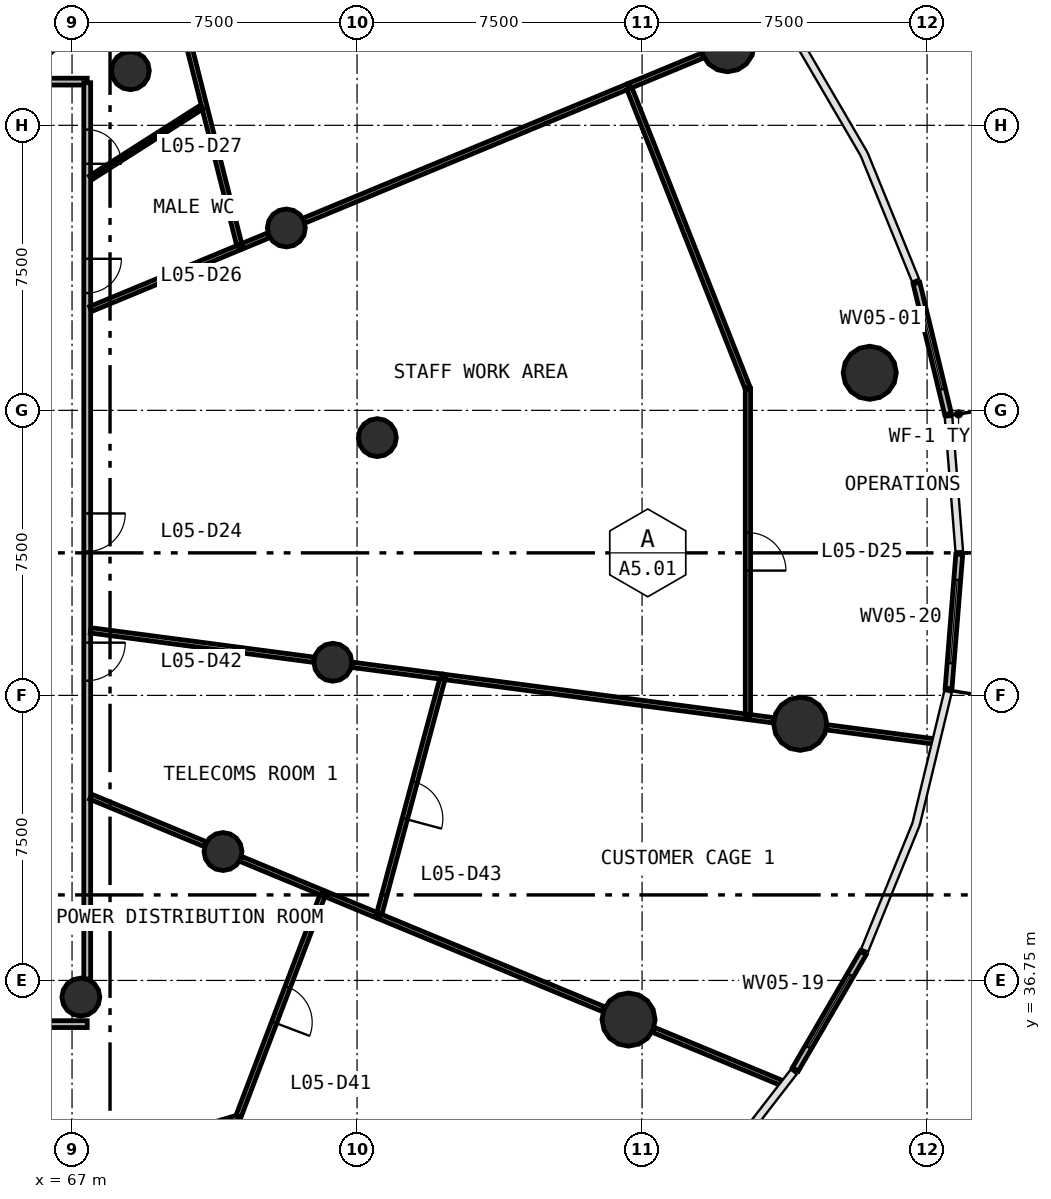
"""IFC4 building model, lengths in metres.
Left out: names, types, materials, properties, quantities, classifications, styles, units other than length and angle.
Written with IfcOpenShell. Run it as: python <this file> out.ifc"""

import sys

from ifc_helpers import new_model, si_unit, direction, frame, frame_2d, origin, origin_2d, place, context, subcontext, project, spatial, rectangle, circle, extrude, source, transform, mapped, element, fill, save


model = new_model("IFC4")
c1 = context("Model", 3, precision=1e-05, world=origin(), true_north=direction((0.0, 1.0)))
c2 = subcontext(c1, "Body", "Model", "MODEL_VIEW")
j1 = project(units=[si_unit("LENGTHUNIT", "METRE"), si_unit("PLANEANGLEUNIT", "RADIAN")], contexts=[c1])
p1 = place(None, origin())
s1 = spatial("IfcSite", under=j1, at=p1, CompositionType="ELEMENT")
p2 = place(p1, origin())
s2 = spatial("IfcBuilding", under=s1, at=p2, CompositionType="ELEMENT")
p3 = place(p2, frame((0.0, 0.0, 22.6)))
s3 = spatial("IfcBuildingStorey", under=s2, at=p3, CompositionType="ELEMENT", Elevation=22.6)
m1 = source(origin(), c2, "Body", "SweptSolid", [
    extrude(circle(Radius=0.7, at=origin_2d()), origin(), (0.0, 0.0, 1.0), 4.4),
])
for number, where, z_axis, x_axis in (
    (1, (87.99, 52.738, 0.0), (0.0, 0.0, 1.0), (1.0, 0.0, 0.0)),
    (2, (84.249, 61.358, 0.0), (0.0, 0.0, 1.0), (1.0, 0.0, 0.0)),
    (3, (81.645, 35.721, 0.0), (0.0, 0.0, 1.0), (1.0, 0.0, 0.0)),
    (4, (86.161, 43.503, 0.0), (0.0, 0.0, 1.0), (1.0, 0.0, 0.0)),
):
    element("IfcColumn", number, at=place(p3, frame(where, z_axis=z_axis, x_axis=x_axis)), inside=s3, PredefinedType="COLUMN", context=c2, shape_type="MappedRepresentation", body=[
        mapped(m1, transform((0.0, 0.0, 0.0), scale=1.0)),
    ])
m2 = source(origin(), c2, "Body", "SweptSolid", [
    extrude(circle(Radius=0.5, at=origin_2d()), origin(), (0.0, 0.0, 1.0), 4.4),
])
for number, where, z_axis, x_axis in (
    (5, (75.034, 51.032, 0.0), (0.0, 0.0, 1.0), (1.0, 0.0, 0.0)),
    (6, (72.639, 56.549, 0.0), (0.0, 0.0, 1.0), (1.0, 0.0, 0.0)),
    (7, (68.535, 60.688, 0.0), (0.0, 0.0, 1.0), (1.0, 0.0, 0.0)),
    (8, (67.232, 36.312, 0.0), (0.0, 0.0, 1.0), (1.0, 0.0, 0.0)),
    (9, (70.972, 40.141, 0.0), (0.0, 0.0, 1.0), (1.0, 0.0, 0.0)),
    (10, (73.863, 45.122, 0.0), (0.0, 0.0, 1.0), (1.0, 0.0, 0.0)),
):
    element("IfcColumn", number, at=place(p3, frame(where, z_axis=z_axis, x_axis=x_axis)), inside=s3, PredefinedType="COLUMN", context=c2, shape_type="MappedRepresentation", body=[
        mapped(m2, transform((0.0, 0.0, 0.0), scale=1.0)),
    ])
p4 = place(p3, frame((90.052, 51.652, 0.0), z_axis=(0.0, 0.0, 1.0), x_axis=(-0.234602378519, 0.972091417508, 0.0)))
e11 = element("IfcWall", 11, at=p4, inside=s3, PredefinedType="STANDARD", context=c2, shape_type="SweptSolid", body=[
    extrude(rectangle(XDim=3.544, YDim=0.18, at=frame_2d((1.772, 0.0))), origin(), (0.0, 0.0, 1.0), 3.698),
])
p5 = place(p4, frame((0.672, 0.0, 0.9)))
e12 = element("IfcOpeningElement", 12, at=p5, cuts=e11, PredefinedType="OPENING", context=c2, shape_type="SweptSolid", body=[
    extrude(rectangle(XDim=2.2, YDim=2.2, at=frame_2d((1.1, 1.1))), frame((0.0, 0.1, 0.0), z_axis=(0.0, -1.0, 0.0), x_axis=(1.0, 0.0, 0.0)), (0.0, 0.0, 1.0), 0.2),
])
p6 = place(p3, frame((86.035, 34.41, 0.0), z_axis=(0.0, 0.0, 1.0), x_axis=(0.503905275905, 0.8637589206, 0.0)))
e13 = element("IfcWall", 13, at=p6, inside=s3, PredefinedType="STANDARD", context=c2, shape_type="SweptSolid", body=[
    extrude(rectangle(XDim=3.546, YDim=0.18, at=frame_2d((1.773, 0.0))), origin(), (0.0, 0.0, 1.0), 3.95),
])
p7 = place(p6, frame((0.673, 0.0, 0.9)))
e14 = element("IfcOpeningElement", 14, at=p7, cuts=e13, PredefinedType="OPENING", context=c2, shape_type="SweptSolid", body=[
    extrude(rectangle(XDim=2.2, YDim=2.2, at=frame_2d((1.1, 1.1))), frame((0.0, 0.1, 0.0), z_axis=(0.0, -1.0, 0.0), x_axis=(1.0, 0.0, 0.0)), (0.0, 0.0, 1.0), 0.2),
])
p8 = place(p3, frame((90.064, 44.427, 0.0), z_axis=(0.0, 0.0, 1.0), x_axis=(0.079624764611, 0.996824907825, 0.0)))
e15 = element("IfcWall", 15, at=p8, inside=s3, PredefinedType="STANDARD", context=c2, shape_type="SweptSolid", body=[
    extrude(rectangle(XDim=3.544, YDim=0.18, at=frame_2d((1.772, 0.0))), origin(), (0.0, 0.0, 1.0), 3.95),
])
p9 = place(p8, frame((0.672, 0.0, 0.9)))
e16 = element("IfcOpeningElement", 16, at=p9, cuts=e15, PredefinedType="OPENING", context=c2, shape_type="SweptSolid", body=[
    extrude(rectangle(XDim=2.2, YDim=2.2, at=frame_2d((1.1, 1.1))), frame((0.0, 0.1, 0.0), z_axis=(0.0, -1.0, 0.0), x_axis=(1.0, 0.0, 0.0)), (0.0, 0.0, 1.0), 0.2),
])
p10 = place(p3, frame((67.4, 35.6, 0.0), z_axis=(0.0, 0.0, 1.0), x_axis=(-1.0, 0.0, 0.0)))
e17 = element("IfcWall", 17, at=p10, inside=s3, PredefinedType="PARTITIONING", context=c2, shape_type="SweptSolid", body=[
    extrude(rectangle(XDim=30.8, YDim=0.18, at=frame_2d((15.4, 0.0))), origin(), (0.0, 0.0, 1.0), 3.05),
])
p11 = place(p10, frame((14.95, 0.0, 0.0)))
e18 = element("IfcOpeningElement", 18, at=p11, cuts=e17, PredefinedType="OPENING", context=c2, shape_type="SweptSolid", body=[
    extrude(rectangle(XDim=1.0, YDim=2.1, at=frame_2d((0.5, 1.05))), frame((0.0, 0.1, 0.0), z_axis=(0.0, -1.0, 0.0), x_axis=(1.0, 0.0, 0.0)), (0.0, 0.0, 1.0), 0.2),
])
p12 = place(p10, frame((12.55, 0.0, 0.0)))
e19 = element("IfcOpeningElement", 19, at=p12, cuts=e17, PredefinedType="OPENING", context=c2, shape_type="SweptSolid", body=[
    extrude(rectangle(XDim=1.0, YDim=2.1, at=frame_2d((0.5, 1.05))), frame((0.0, 0.1, 0.0), z_axis=(0.0, -1.0, 0.0), x_axis=(1.0, 0.0, 0.0)), (0.0, 0.0, 1.0), 0.2),
])
p13 = place(p10, frame((8.95, 0.0, 0.0)))
e20 = element("IfcOpeningElement", 20, at=p13, cuts=e17, PredefinedType="OPENING", context=c2, shape_type="SweptSolid", body=[
    extrude(rectangle(XDim=1.0, YDim=2.1, at=frame_2d((0.5, 1.05))), frame((0.0, 0.1, 0.0), z_axis=(0.0, -1.0, 0.0), x_axis=(1.0, 0.0, 0.0)), (0.0, 0.0, 1.0), 0.2),
])
p14 = place(p3, frame((36.6, 60.4, 0.0), z_axis=(0.0, 0.0, 1.0), x_axis=(1.0, 0.0, 0.0)))
e21 = element("IfcWall", 21, at=p14, inside=s3, PredefinedType="PARTITIONING", context=c2, shape_type="SweptSolid", body=[
    extrude(rectangle(XDim=30.8, YDim=0.18, at=frame_2d((15.4, 0.0))), origin(), (0.0, 0.0, 1.0), 3.05),
])
p15 = place(p14, frame((25.45, 0.0, 0.0)))
e22 = element("IfcOpeningElement", 22, at=p15, cuts=e21, PredefinedType="OPENING", context=c2, shape_type="SweptSolid", body=[
    extrude(rectangle(XDim=0.9, YDim=2.1, at=frame_2d((0.45, 1.05))), frame((0.0, 0.1, 0.0), z_axis=(0.0, -1.0, 0.0), x_axis=(1.0, 0.0, 0.0)), (0.0, 0.0, 1.0), 0.2),
])
p16 = place(p14, frame((14.95, 0.0, 0.0)))
e23 = element("IfcOpeningElement", 23, at=p16, cuts=e21, PredefinedType="OPENING", context=c2, shape_type="SweptSolid", body=[
    extrude(rectangle(XDim=1.0, YDim=2.1, at=frame_2d((0.5, 1.05))), frame((0.0, 0.1, 0.0), z_axis=(0.0, -1.0, 0.0), x_axis=(1.0, 0.0, 0.0)), (0.0, 0.0, 1.0), 0.2),
])
p17 = place(p14, frame((8.95, 0.0, 0.0)))
e24 = element("IfcOpeningElement", 24, at=p17, cuts=e21, PredefinedType="OPENING", context=c2, shape_type="SweptSolid", body=[
    extrude(rectangle(XDim=1.0, YDim=2.1, at=frame_2d((0.5, 1.05))), frame((0.0, 0.1, 0.0), z_axis=(0.0, -1.0, 0.0), x_axis=(1.0, 0.0, 0.0)), (0.0, 0.0, 1.0), 0.2),
])
p18 = place(p3, frame((67.4, 60.37, 0.0), z_axis=(0.0, 0.0, 1.0), x_axis=(0.0, -1.0, 0.0)))
e25 = element("IfcWall", 25, at=p18, inside=s3, PredefinedType="PARTITIONING", context=c2, shape_type="SweptSolid", body=[
    extrude(rectangle(XDim=23.583, YDim=0.18, at=frame_2d((11.791, 0.0))), origin(), (0.0, 0.0, 1.0), 3.05),
])
p19 = place(p18, frame((11.333, 0.0, 0.0)))
e26 = element("IfcOpeningElement", 26, at=p19, cuts=e25, PredefinedType="OPENING", context=c2, shape_type="SweptSolid", body=[
    extrude(rectangle(XDim=1.0, YDim=2.1, at=frame_2d((0.5, 1.05))), frame((0.0, 0.1, 0.0), z_axis=(0.0, -1.0, 0.0), x_axis=(1.0, 0.0, 0.0)), (0.0, 0.0, 1.0), 0.2),
])
p20 = place(p18, frame((4.633, 0.0, 0.0)))
e27 = element("IfcOpeningElement", 27, at=p20, cuts=e25, PredefinedType="OPENING", context=c2, shape_type="SweptSolid", body=[
    extrude(rectangle(XDim=0.9, YDim=2.1, at=frame_2d((0.45, 1.05))), frame((0.0, 0.1, 0.0), z_axis=(0.0, -1.0, 0.0), x_axis=(1.0, 0.0, 0.0)), (0.0, 0.0, 1.0), 0.2),
])
p21 = place(p18, frame((1.232, 0.0, 0.0)))
e28 = element("IfcOpeningElement", 28, at=p21, cuts=e25, PredefinedType="OPENING", context=c2, shape_type="SweptSolid", body=[
    extrude(rectangle(XDim=0.9, YDim=2.1, at=frame_2d((0.45, 1.05))), frame((0.0, 0.1, 0.0), z_axis=(0.0, -1.0, 0.0), x_axis=(1.0, 0.0, 0.0)), (0.0, 0.0, 1.0), 0.2),
])
p22 = place(p18, frame((14.732, 0.0, 0.0)))
e29 = element("IfcOpeningElement", 29, at=p22, cuts=e25, PredefinedType="OPENING", context=c2, shape_type="SweptSolid", body=[
    extrude(rectangle(XDim=1.0, YDim=2.1, at=frame_2d((0.5, 1.05))), frame((0.0, 0.1, 0.0), z_axis=(0.0, -1.0, 0.0), x_axis=(1.0, 0.0, 0.0)), (0.0, 0.0, 1.0), 0.2),
])
p23 = place(p3, frame((73.106, 56.742, 0.0), z_axis=(0.0, 0.0, 1.0), x_axis=(0.923866773136, 0.382714234769, 0.0)))
e30 = element("IfcWall", 30, at=p23, inside=s3, PredefinedType="PARTITIONING", context=c2, shape_type="SweptSolid", body=[
    extrude(rectangle(XDim=9.241, YDim=0.14, at=frame_2d((4.621, 0.0))), origin(), (0.0, 0.0, 1.0), 3.05),
])
p24 = place(p3, frame((84.785, 52.316, 0.0), z_axis=(0.0, 0.0, 1.0), x_axis=(0.0, -1.0, 0.0)))
e31 = element("IfcWall", 31, at=p24, inside=s3, PredefinedType="PARTITIONING", context=c2, shape_type="SweptSolid", body=[
    extrude(rectangle(XDim=8.633, YDim=0.14, at=frame_2d((4.316, 0.0))), origin(), (0.0, 0.0, 1.0), 3.05),
])
p25 = place(p24, frame((3.783, 0.0, 0.0)))
e32 = element("IfcOpeningElement", 32, at=p25, cuts=e31, PredefinedType="OPENING", context=c2, shape_type="SweptSolid", body=[
    extrude(rectangle(XDim=1.0, YDim=2.1, at=frame_2d((0.5, 1.05))), frame((0.0, 0.08, 0.0), z_axis=(0.0, -1.0, 0.0), x_axis=(1.0, 0.0, 0.0)), (0.0, 0.0, 1.0), 0.16),
])
p26 = place(p3, frame((84.774, 52.344, 0.0), z_axis=(0.0, 0.0, 1.0), x_axis=(-0.36705286117, 0.930200084448, 0.0)))
e33 = element("IfcWall", 33, at=p26, inside=s3, PredefinedType="PARTITIONING", context=c2, shape_type="SweptSolid", body=[
    extrude(rectangle(XDim=8.46, YDim=0.14, at=frame_2d((4.23, 0.0))), origin(), (0.0, 0.0, 1.0), 3.05),
])
p27 = place(p3, frame((76.761, 44.74, 0.0), z_axis=(0.0, 0.0, 1.0), x_axis=(0.991445281649, -0.130522999877, 0.0)))
e34 = element("IfcWall", 34, at=p27, inside=s3, PredefinedType="PARTITIONING", context=c2, shape_type="SweptSolid", body=[
    extrude(rectangle(XDim=8.022, YDim=0.14, at=frame_2d((4.011, 0.0))), origin(), (0.0, 0.0, 1.0), 3.05),
])
p28 = place(p3, frame((64.886, 31.206, 0.0), z_axis=(0.0, 0.0, 1.0), x_axis=(0.958287066923, 0.285807448063, 0.0)))
e35 = element("IfcWall", 35, at=p28, inside=s3, PredefinedType="PARTITIONING", context=c2, shape_type="SweptSolid", body=[
    extrude(rectangle(XDim=6.763, YDim=0.14, at=frame_2d((3.381, 0.0))), origin(), (0.0, 0.0, 1.0), 3.05),
])
p29 = place(p3, frame((76.754, 44.711, 0.0), z_axis=(0.0, 0.0, 1.0), x_axis=(-0.259521453513, -0.965737342742, 0.0)))
e36 = element("IfcWall", 36, at=p29, inside=s3, PredefinedType="PARTITIONING", context=c2, shape_type="SweptSolid", body=[
    extrude(rectangle(XDim=6.489, YDim=0.14, at=frame_2d((3.245, 0.0))), origin(), (0.0, 0.0, 1.0), 3.05),
])
p30 = place(p29, frame((2.839, 0.0, 0.0)))
e37 = element("IfcOpeningElement", 37, at=p30, cuts=e36, PredefinedType="OPENING", context=c2, shape_type="SweptSolid", body=[
    extrude(rectangle(XDim=1.0, YDim=2.1, at=frame_2d((0.5, 1.05))), frame((0.0, 0.08, 0.0), z_axis=(0.0, -1.0, 0.0), x_axis=(1.0, 0.0, 0.0)), (0.0, 0.0, 1.0), 0.16),
])
p31 = place(p3, frame((75.097, 38.433, 0.0), z_axis=(0.0, 0.0, 1.0), x_axis=(0.923869490045, -0.382707676125, 0.0)))
e38 = element("IfcWall", 38, at=p31, inside=s3, PredefinedType="PARTITIONING", context=c2, shape_type="SweptSolid", body=[
    extrude(rectangle(XDim=6.382, YDim=0.14, at=frame_2d((3.191, 0.0))), origin(), (0.0, 0.0, 1.0), 3.05),
])
p32 = place(p3, frame((73.613, 39.048, 0.0), z_axis=(0.0, 0.0, 1.0), x_axis=(-0.355249637072, -0.934771466916, 0.0)))
e39 = element("IfcWall", 39, at=p32, inside=s3, PredefinedType="PARTITIONING", context=c2, shape_type="SweptSolid", body=[
    extrude(rectangle(XDim=6.291, YDim=0.14, at=frame_2d((3.146, 0.0))), origin(), (0.0, 0.0, 1.0), 3.05),
])
p33 = place(p32, frame((2.641, 0.0, 0.0)))
e40 = element("IfcOpeningElement", 40, at=p33, cuts=e39, PredefinedType="OPENING", context=c2, shape_type="SweptSolid", body=[
    extrude(rectangle(XDim=1.0, YDim=2.1, at=frame_2d((0.5, 1.05))), frame((0.0, 0.08, 0.0), z_axis=(0.0, -1.0, 0.0), x_axis=(1.0, 0.0, 0.0)), (0.0, 0.0, 1.0), 0.16),
])
p34 = place(p3, frame((67.49, 45.961, 0.0), z_axis=(0.0, 0.0, 1.0), x_axis=(0.991445034615, -0.130524876315, 0.0)))
e41 = element("IfcWall", 41, at=p34, inside=s3, PredefinedType="PARTITIONING", context=c2, shape_type="SweptSolid", body=[
    extrude(rectangle(XDim=5.924, YDim=0.14, at=frame_2d((2.962, 0.0))), origin(), (0.0, 0.0, 1.0), 3.05),
])
p35 = place(p3, frame((71.417, 56.043, 0.0), z_axis=(0.0, 0.0, 1.0), x_axis=(-0.245211508641, 0.969469605521, 0.0)))
e42 = element("IfcWall", 42, at=p35, inside=s3, PredefinedType="PARTITIONING", context=c2, shape_type="SweptSolid", body=[
    extrude(rectangle(XDim=5.923, YDim=0.14, at=frame_2d((2.961, 0.0))), origin(), (0.0, 0.0, 1.0), 3.05),
])
p36 = place(p3, frame((67.49, 54.416, 0.0), z_axis=(0.0, 0.0, 1.0), x_axis=(0.92388430195, 0.382671917718, 0.0)))
e43 = element("IfcWall", 43, at=p36, inside=s3, PredefinedType="PARTITIONING", context=c2, shape_type="SweptSolid", body=[
    extrude(rectangle(XDim=4.221, YDim=0.14, at=frame_2d((2.11, 0.0))), origin(), (0.0, 0.0, 1.0), 3.05),
])
p37 = place(p3, frame((82.296, 35.451, 0.0), z_axis=(0.0, 0.0, 1.0), x_axis=(0.923882033439, -0.382677394537, 0.0)))
e44 = element("IfcWall", 44, at=p37, inside=s3, PredefinedType="PARTITIONING", context=c2, shape_type="SweptSolid", body=[
    extrude(rectangle(XDim=3.642, YDim=0.14, at=frame_2d((1.821, 0.0))), origin(), (0.0, 0.0, 1.0), 3.05),
])
p38 = place(p3, frame((67.49, 41.584, 0.0), z_axis=(0.0, 0.0, 1.0), x_axis=(0.923911109142, -0.382607190737, 0.0)))
e45 = element("IfcWall", 45, at=p38, inside=s3, PredefinedType="PARTITIONING", context=c2, shape_type="SweptSolid", body=[
    extrude(rectangle(XDim=3.264, YDim=0.14, at=frame_2d((1.632, 0.0))), origin(), (0.0, 0.0, 1.0), 3.05),
])
p39 = place(p3, frame((86.859, 43.411, 0.0), z_axis=(0.0, 0.0, 1.0), x_axis=(0.991443227873, -0.130538599287, 0.0)))
e46 = element("IfcWall", 46, at=p39, inside=s3, PredefinedType="PARTITIONING", context=c2, shape_type="SweptSolid", body=[
    extrude(rectangle(XDim=2.854, YDim=0.14, at=frame_2d((1.427, 0.0))), origin(), (0.0, 0.0, 1.0), 3.05),
])
p40 = place(p3, frame((74.363, 45.056, 0.0), z_axis=(0.0, 0.0, 1.0), x_axis=(0.991433759963, -0.130610488118, 0.0)))
e47 = element("IfcWall", 47, at=p40, inside=s3, PredefinedType="PARTITIONING", context=c2, shape_type="SweptSolid", body=[
    extrude(rectangle(XDim=2.389, YDim=0.14, at=frame_2d((1.194, 0.0))), origin(), (0.0, 0.0, 1.0), 3.05),
])
p41 = place(p3, frame((71.439, 39.948, 0.0), z_axis=(0.0, 0.0, 1.0), x_axis=(0.923861804277, -0.382726229306, 0.0)))
e48 = element("IfcWall", 48, at=p41, inside=s3, PredefinedType="PARTITIONING", context=c2, shape_type="SweptSolid", body=[
    extrude(rectangle(XDim=2.323, YDim=0.14, at=frame_2d((1.161, 0.0))), origin(), (0.0, 0.0, 1.0), 3.05),
])
p42 = place(p3, frame((81.671, 60.29, 0.0), z_axis=(0.0, 0.0, 1.0), x_axis=(0.923902679831, 0.382627545012, 0.0)))
e49 = element("IfcWall", 49, at=p42, inside=s3, PredefinedType="PARTITIONING", context=c2, shape_type="SweptSolid", body=[
    extrude(rectangle(XDim=2.085, YDim=0.14, at=frame_2d((1.042, 0.0))), origin(), (0.0, 0.0, 1.0), 3.05),
])
p43 = place(p3, frame((73.677, 39.021, 0.0), z_axis=(0.0, 0.0, 1.0), x_axis=(0.923859397542, -0.382732038864, 0.0)))
e50 = element("IfcWall", 50, at=p43, inside=s3, PredefinedType="PARTITIONING", context=c2, shape_type="SweptSolid", body=[
    extrude(rectangle(XDim=1.437, YDim=0.14, at=frame_2d((0.718, 0.0))), origin(), (0.0, 0.0, 1.0), 3.05),
])
p44 = place(p3, frame((71.483, 56.07, 0.0), z_axis=(0.0, 0.0, 1.0), x_axis=(0.923945120737, 0.382525049986, 0.0)))
e51 = element("IfcWall", 51, at=p44, inside=s3, PredefinedType="PARTITIONING", context=c2, shape_type="SweptSolid", body=[
    extrude(rectangle(XDim=0.747, YDim=0.14, at=frame_2d((0.374, 0.0))), origin(), (0.0, 0.0, 1.0), 3.05),
])
p45 = place(p3, frame((84.815, 43.68, 0.0), z_axis=(0.0, 0.0, 1.0), x_axis=(0.991458111103, -0.130425511035, 0.0)))
e52 = element("IfcWall", 52, at=p45, inside=s3, PredefinedType="PARTITIONING", context=c2, shape_type="SweptSolid", body=[
    extrude(rectangle(XDim=0.653, YDim=0.14, at=frame_2d((0.327, 0.0))), origin(), (0.0, 0.0, 1.0), 3.05),
])
p46 = place(p3, frame((67.49, 57.868, 0.0), z_axis=(0.0, 0.0, 1.0), x_axis=(0.843371271412, 0.537331274501, 0.0)))
e53 = element("IfcWall", 53, at=p46, inside=s3, PredefinedType="PARTITIONING", context=c2, shape_type="SweptSolid", body=[
    extrude(rectangle(XDim=3.465, YDim=0.12, at=frame_2d((1.733, 0.0))), origin(), (0.0, 0.0, 1.0), 3.05),
])
p47 = place(p3, frame((65.63, 60.49, 0.0), z_axis=(0.0, 0.0, 1.0), x_axis=(0.737304203513, 0.675560886584, 0.0)))
e54 = element("IfcWall", 54, at=p47, inside=s3, PredefinedType="PARTITIONING", context=c2, shape_type="SweptSolid", body=[
    extrude(rectangle(XDim=2.634, YDim=0.12, at=frame_2d((1.317, 0.0))), origin(), (0.0, 0.0, 1.0), 3.05),
])
m3 = source(origin(), c2, "Body", "SweptSolid", [
    extrude(rectangle(XDim=2.2, YDim=2.2, at=frame_2d((1.1, 1.1))), frame((0.0, 0.03, 0.0), z_axis=(0.0, -1.0, 0.0), x_axis=(1.0, 0.0, 0.0)), (0.0, 0.0, 1.0), 0.06),
])
p48 = place(p5, origin())
e55 = element("IfcWindow", 55, at=p48, inside=s3, PartitioningType="SINGLE_PANEL", PredefinedType="WINDOW", context=c2, shape_type="MappedRepresentation", body=[
    mapped(m3, transform((0.0, 0.0, 0.0), scale=1.0)),
])
fill(e12, e55)
p49 = place(p7, origin())
e56 = element("IfcWindow", 56, at=p49, inside=s3, PartitioningType="SINGLE_PANEL", PredefinedType="WINDOW", context=c2, shape_type="MappedRepresentation", body=[
    mapped(m3, transform((0.0, 0.0, 0.0), scale=1.0)),
])
fill(e14, e56)
p50 = place(p9, origin())
e57 = element("IfcWindow", 57, at=p50, inside=s3, PartitioningType="SINGLE_PANEL", PredefinedType="WINDOW", context=c2, shape_type="MappedRepresentation", body=[
    mapped(m3, transform((0.0, 0.0, 0.0), scale=1.0)),
])
fill(e16, e57)
m4 = source(origin(), c2, "Body", "SweptSolid", [
    extrude(rectangle(XDim=1.0, YDim=2.1, at=frame_2d((0.5, 1.05))), frame((0.0, 0.025, 0.0), z_axis=(0.0, -1.0, 0.0), x_axis=(1.0, 0.0, 0.0)), (0.0, 0.0, 1.0), 0.05),
])
p51 = place(p19, origin())
e58 = element("IfcDoor", 58, at=p51, inside=s3, OperationType="SINGLE_SWING_LEFT", PredefinedType="DOOR", context=c2, shape_type="MappedRepresentation", body=[
    mapped(m4, transform((0.0, 0.0, 0.0), scale=1.0)),
])
fill(e26, e58)
p52 = place(p25, origin())
e59 = element("IfcDoor", 59, at=p52, inside=s3, OperationType="SINGLE_SWING_RIGHT", PredefinedType="DOOR", context=c2, shape_type="MappedRepresentation", body=[
    mapped(m4, transform((0.0, 0.0, 0.0), scale=1.0)),
])
fill(e32, e59)
m5 = source(origin(), c2, "Body", "SweptSolid", [
    extrude(rectangle(XDim=0.9, YDim=2.1, at=frame_2d((0.45, 1.05))), frame((0.0, 0.025, 0.0), z_axis=(0.0, -1.0, 0.0), x_axis=(1.0, 0.0, 0.0)), (0.0, 0.0, 1.0), 0.05),
])
p53 = place(p20, origin())
e60 = element("IfcDoor", 60, at=p53, inside=s3, OperationType="SINGLE_SWING_LEFT", PredefinedType="DOOR", context=c2, shape_type="MappedRepresentation", body=[
    mapped(m5, transform((0.0, 0.0, 0.0), scale=1.0)),
])
fill(e27, e60)
p54 = place(p21, origin())
e61 = element("IfcDoor", 61, at=p54, inside=s3, OperationType="SINGLE_SWING_RIGHT", PredefinedType="DOOR", context=c2, shape_type="MappedRepresentation", body=[
    mapped(m5, transform((0.0, 0.0, 0.0), scale=1.0)),
])
fill(e28, e61)
p55 = place(p33, origin())
e62 = element("IfcDoor", 62, at=p55, inside=s3, OperationType="SINGLE_SWING_RIGHT", PredefinedType="DOOR", context=c2, shape_type="MappedRepresentation", body=[
    mapped(m4, transform((0.0, 0.0, 0.0), scale=1.0)),
])
fill(e40, e62)
p56 = place(p22, origin())
e63 = element("IfcDoor", 63, at=p56, inside=s3, OperationType="SINGLE_SWING_LEFT", PredefinedType="DOOR", context=c2, shape_type="MappedRepresentation", body=[
    mapped(m4, transform((0.0, 0.0, 0.0), scale=1.0)),
])
fill(e29, e63)
p57 = place(p30, origin())
e64 = element("IfcDoor", 64, at=p57, inside=s3, OperationType="SINGLE_SWING_RIGHT", PredefinedType="DOOR", context=c2, shape_type="MappedRepresentation", body=[
    mapped(m4, transform((0.0, 0.0, 0.0), scale=1.0)),
])
fill(e37, e64)
save(model, sys.argv[1])
